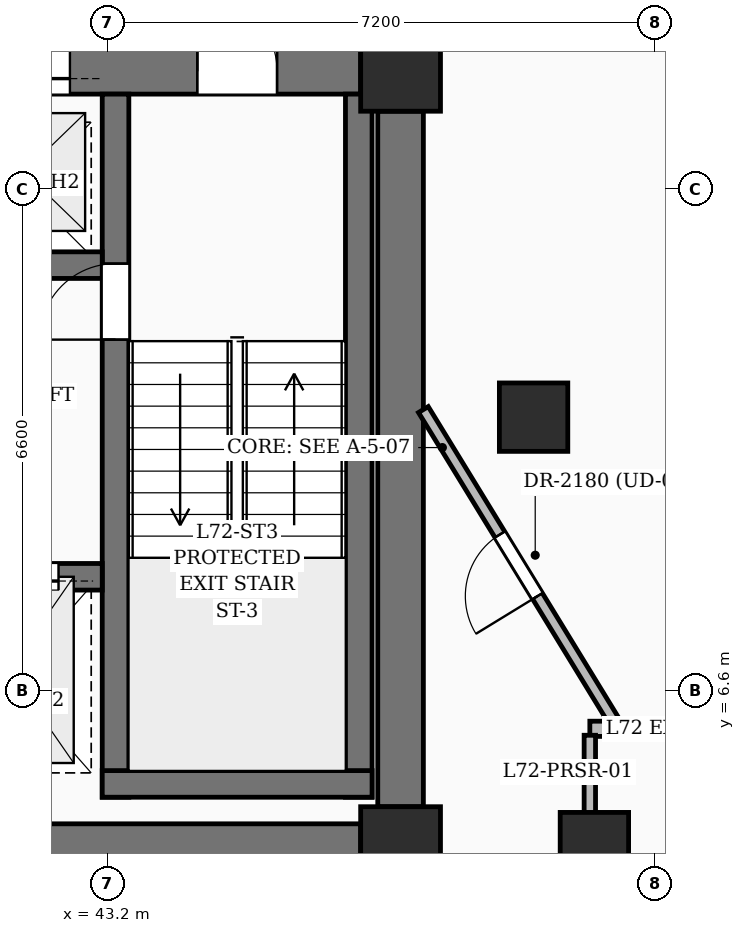
"""IFC4 building model, lengths in metres.
Left out: names, types, materials, properties, quantities, classifications, styles, units other than length and angle.
Written with IfcOpenShell. Run it as: python <this file> out.ifc"""

import sys

from ifc_helpers import new_model, si_unit, direction, frame, frame_2d, origin, origin_2d, place, context, subcontext, project, spatial, rectangle, extrude, element, fill, save


model = new_model("IFC4")
c1 = context("Model", 3, precision=1e-05, world=origin(), true_north=direction((0.0, 1.0)))
c2 = subcontext(c1, "Body", "Model", "MODEL_VIEW")
j1 = project(units=[si_unit("LENGTHUNIT", "METRE"), si_unit("PLANEANGLEUNIT", "RADIAN")], contexts=[c1])
p1 = place(None, origin())
s1 = spatial("IfcSite", under=j1, at=p1, CompositionType="ELEMENT")
p2 = place(p1, origin())
s2 = spatial("IfcBuilding", under=s1, at=p2, CompositionType="ELEMENT")
p3 = place(p2, frame((0.0, 0.0, 278.25)))
s3 = spatial("IfcBuildingStorey", under=s2, at=p3, CompositionType="ELEMENT", Elevation=278.25)
for number, where, z_axis, x_axis in (
    (1, (47.05, 4.55, 0.0), (0.0, 0.0, 1.0), (1.0, 0.0, 0.0)),
    (2, (47.05, 14.75, 0.0), (0.0, 0.0, 1.0), (1.0, 0.0, 0.0)),
):
    element("IfcColumn", number, at=place(p3, frame(where, z_axis=z_axis, x_axis=x_axis)), inside=s3, PredefinedType="COLUMN", context=c2, shape_type="SweptSolid", body=[
        extrude(rectangle(XDim=1.05, YDim=1.05, at=origin_2d()), origin(), (0.0, 0.0, 1.0), 3.75),
    ])
for number, where, z_axis, x_axis in (
    (3, (49.6, 4.55, 0.0), (0.0, 0.0, 1.0), (1.0, 0.0, 0.0)),
    (4, (48.8, 10.2, 0.0), (0.0, 0.0, 1.0), (1.0, 0.0, 0.0)),
):
    element("IfcColumn", number, at=place(p3, frame(where, z_axis=z_axis, x_axis=x_axis)), inside=s3, PredefinedType="COLUMN", context=c2, shape_type="SweptSolid", body=[
        extrude(rectangle(XDim=0.9, YDim=0.9, at=origin_2d()), origin(), (0.0, 0.0, 1.0), 3.75),
    ])
p4 = place(p3, frame((35.675, 4.55, 0.0), z_axis=(0.0, 0.0, 1.0), x_axis=(1.0, 0.0, 0.0)))
e5 = element("IfcWall", 5, at=p4, inside=s3, PredefinedType="SHEAR", context=c2, shape_type="SweptSolid", body=[
    extrude(rectangle(XDim=10.85, YDim=0.6, at=frame_2d((5.425, 0.0))), origin(), (0.0, 0.0, 1.0), 3.75),
])
p5 = place(p3, frame((35.675, 14.75, 0.0), z_axis=(0.0, 0.0, 1.0), x_axis=(1.0, 0.0, 0.0)))
e6 = element("IfcWall", 6, at=p5, inside=s3, PredefinedType="SHEAR", context=c2, shape_type="SweptSolid", body=[
    extrude(rectangle(XDim=10.85, YDim=0.6, at=frame_2d((5.425, 0.0))), origin(), (0.0, 0.0, 1.0), 3.75),
])
p6 = place(p5, frame((1.1, 0.0, 0.0)))
e7 = element("IfcOpeningElement", 7, at=p6, cuts=e6, PredefinedType="OPENING", context=c2, shape_type="SweptSolid", body=[
    extrude(rectangle(XDim=1.05, YDim=2.15, at=frame_2d((0.525, 1.075))), frame((0.0, 0.31, 0.0), z_axis=(0.0, -1.0, 0.0), x_axis=(1.0, 0.0, 0.0)), (0.0, 0.0, 1.0), 0.62),
])
p7 = place(p5, frame((8.7, 0.0, 0.0)))
e8 = element("IfcOpeningElement", 8, at=p7, cuts=e6, PredefinedType="OPENING", context=c2, shape_type="SweptSolid", body=[
    extrude(rectangle(XDim=1.05, YDim=2.15, at=frame_2d((0.525, 1.075))), frame((0.0, 0.31, 0.0), z_axis=(0.0, -1.0, 0.0), x_axis=(1.0, 0.0, 0.0)), (0.0, 0.0, 1.0), 0.62),
])
p8 = place(p5, frame((3.825, 0.0, 0.0)))
e9 = element("IfcOpeningElement", 9, at=p8, cuts=e6, PredefinedType="OPENING", context=c2, shape_type="SweptSolid", body=[
    extrude(rectangle(XDim=1.2, YDim=2.2, at=frame_2d((0.6, 1.1))), frame((0.0, 0.31, 0.0), z_axis=(0.0, -1.0, 0.0), x_axis=(1.0, 0.0, 0.0)), (0.0, 0.0, 1.0), 0.62),
])
p9 = place(p5, frame((5.825, 0.0, 0.0)))
e10 = element("IfcOpeningElement", 10, at=p9, cuts=e6, PredefinedType="OPENING", context=c2, shape_type="SweptSolid", body=[
    extrude(rectangle(XDim=1.2, YDim=2.2, at=frame_2d((0.6, 1.1))), frame((0.0, 0.31, 0.0), z_axis=(0.0, -1.0, 0.0), x_axis=(1.0, 0.0, 0.0)), (0.0, 0.0, 1.0), 0.62),
])
p10 = place(p3, frame((47.05, 5.075, 0.0), z_axis=(0.0, 0.0, 1.0), x_axis=(0.0, 1.0, 0.0)))
e11 = element("IfcWall", 11, at=p10, inside=s3, PredefinedType="SHEAR", context=c2, shape_type="SweptSolid", body=[
    extrude(rectangle(XDim=9.15, YDim=0.6, at=frame_2d((4.575, 0.0))), origin(), (0.0, 0.0, 1.0), 3.75),
])
p11 = place(p3, frame((43.3, 5.2, 0.0), z_axis=(0.0, 0.0, 1.0), x_axis=(0.0, 1.0, 0.0)))
e12 = element("IfcWall", 12, at=p11, inside=s3, PredefinedType="SOLIDWALL", context=c2, shape_type="SweptSolid", body=[
    extrude(rectangle(XDim=9.25, YDim=0.35, at=frame_2d((4.625, 0.0))), origin(), (0.0, 0.0, 1.0), 3.75),
])
p12 = place(p11, frame((6.02, 0.0, 0.0)))
e13 = element("IfcOpeningElement", 13, at=p12, cuts=e12, PredefinedType="OPENING", context=c2, shape_type="SweptSolid", body=[
    extrude(rectangle(XDim=1.0, YDim=2.15, at=frame_2d((0.5, 1.075))), frame((0.0, 0.185, 0.0), z_axis=(0.0, -1.0, 0.0), x_axis=(1.0, 0.0, 0.0)), (0.0, 0.0, 1.0), 0.37),
])
p13 = place(p3, frame((46.5, 5.2, 0.0), z_axis=(0.0, 0.0, 1.0), x_axis=(0.0, 1.0, 0.0)))
e14 = element("IfcWall", 14, at=p13, inside=s3, PredefinedType="SOLIDWALL", context=c2, shape_type="SweptSolid", body=[
    extrude(rectangle(XDim=9.25, YDim=0.35, at=frame_2d((4.625, 0.0))), origin(), (0.0, 0.0, 1.0), 3.75),
])
p14 = place(p3, frame((43.125, 5.375, 0.0), z_axis=(0.0, 0.0, 1.0), x_axis=(1.0, 0.0, 0.0)))
e15 = element("IfcWall", 15, at=p14, inside=s3, PredefinedType="SOLIDWALL", context=c2, shape_type="SweptSolid", body=[
    extrude(rectangle(XDim=3.55, YDim=0.35, at=frame_2d((1.775, 0.0))), origin(), (0.0, 0.0, 1.0), 3.75),
])
p15 = place(p3, frame((40.55, 8.1, 0.0), z_axis=(0.0, 0.0, 1.0), x_axis=(1.0, 0.0, 0.0)))
e16 = element("IfcWall", 16, at=p15, inside=s3, PredefinedType="SOLIDWALL", context=c2, shape_type="SweptSolid", body=[
    extrude(rectangle(XDim=2.575, YDim=0.35, at=frame_2d((1.288, 0.0))), origin(), (0.0, 0.0, 1.0), 3.75),
])
p16 = place(p15, frame((0.7, 0.0, 0.0)))
e17 = element("IfcOpeningElement", 17, at=p16, cuts=e16, PredefinedType="OPENING", context=c2, shape_type="SweptSolid", body=[
    extrude(rectangle(XDim=1.3, YDim=2.25, at=frame_2d((0.65, 1.125))), frame((0.0, 0.185, 0.0), z_axis=(0.0, -1.0, 0.0), x_axis=(1.0, 0.0, 0.0)), (0.0, 0.0, 1.0), 0.37),
])
p17 = place(p3, frame((39.075, 12.2, 0.0), z_axis=(0.0, 0.0, 1.0), x_axis=(1.0, 0.0, 0.0)))
e18 = element("IfcWall", 18, at=p17, inside=s3, PredefinedType="SOLIDWALL", context=c2, shape_type="SweptSolid", body=[
    extrude(rectangle(XDim=4.05, YDim=0.35, at=frame_2d((2.025, 0.0))), origin(), (0.0, 0.0, 1.0), 3.75),
])
p18 = place(p3, frame((49.75, 18.169, 0.0), z_axis=(0.0, 0.0, 1.0), x_axis=(0.441331539311, -0.897344121511, 0.0)))
e19 = element("IfcWall", 19, at=p18, inside=s3, PredefinedType="SOLIDWALL", context=c2, shape_type="SweptSolid", body=[
    extrude(rectangle(XDim=7.051, YDim=0.3, at=frame_2d((3.525, 0.0))), origin(), (0.0, 0.0, 1.0), 3.5),
])
p19 = place(p18, frame((1.545, 0.0, 0.6)))
e20 = element("IfcOpeningElement", 20, at=p19, cuts=e19, PredefinedType="OPENING", context=c2, shape_type="SweptSolid", body=[
    extrude(rectangle(XDim=2.4, YDim=2.1, at=frame_2d((1.2, 1.05))), frame((0.0, 0.16, 0.0), z_axis=(0.0, -1.0, 0.0), x_axis=(1.0, 0.0, 0.0)), (0.0, 0.0, 1.0), 0.32),
])
p20 = place(p3, frame((49.54, 6.1, 0.0), z_axis=(0.0, 0.0, 1.0), x_axis=(1.0, 0.0, 0.0)))
e21 = element("IfcWall", 21, at=p20, inside=s3, PredefinedType="PARTITIONING", context=c2, shape_type="SweptSolid", body=[
    extrude(rectangle(XDim=0.38, YDim=0.2, at=frame_2d((0.19, 0.0))), origin(), (0.0, 0.0, 1.0), 3.5),
])
p21 = place(p3, frame((49.875, 6.173, 0.0), z_axis=(0.0, 0.0, 1.0), x_axis=(-0.521911175453, 0.852999838767, 0.0)))
e22 = element("IfcWall", 22, at=p21, inside=s3, PredefinedType="PARTITIONING", context=c2, shape_type="SweptSolid", body=[
    extrude(rectangle(XDim=4.839, YDim=0.15, at=frame_2d((2.419, 0.0))), origin(), (0.0, 0.0, 1.0), 2.685),
])
p22 = place(p21, frame((1.961, 0.0, 0.0)))
e23 = element("IfcOpeningElement", 23, at=p22, cuts=e22, PredefinedType="OPENING", context=c2, shape_type="SweptSolid", body=[
    extrude(rectangle(XDim=0.95, YDim=2.2, at=frame_2d((0.475, 1.1))), frame((0.0, 0.085, 0.0), z_axis=(0.0, -1.0, 0.0), x_axis=(1.0, 0.0, 0.0)), (0.0, 0.0, 1.0), 0.17),
])
p23 = place(p3, frame((49.54, 3.22, 0.0), z_axis=(0.0, 0.0, 1.0), x_axis=(0.0, 1.0, 0.0)))
e24 = element("IfcWall", 24, at=p23, inside=s3, PredefinedType="PARTITIONING", context=c2, shape_type="SweptSolid", body=[
    extrude(rectangle(XDim=2.795, YDim=0.15, at=frame_2d((1.397, 0.0))), origin(), (0.0, 0.0, 1.0), 2.691),
])
p24 = place(p19, origin())
e25 = element("IfcWindow", 25, at=p24, inside=s3, PartitioningType="SINGLE_PANEL", PredefinedType="WINDOW", context=c2, shape_type="SweptSolid", body=[
    extrude(rectangle(XDim=2.4, YDim=2.1, at=frame_2d((1.2, 1.05))), frame((0.0, 0.03, 0.0), z_axis=(0.0, -1.0, 0.0), x_axis=(1.0, 0.0, 0.0)), (0.0, 0.0, 1.0), 0.06),
])
fill(e20, e25)
p25 = place(p7, origin())
e26 = element("IfcDoor", 26, at=p25, inside=s3, OperationType="SINGLE_SWING_LEFT", PredefinedType="DOOR", context=c2, shape_type="SweptSolid", body=[
    extrude(rectangle(XDim=1.05, YDim=2.15, at=frame_2d((0.525, 1.075))), frame((0.0, 0.025, 0.0), z_axis=(0.0, -1.0, 0.0), x_axis=(1.0, 0.0, 0.0)), (0.0, 0.0, 1.0), 0.05),
])
fill(e8, e26)
p26 = place(p12, origin())
e27 = element("IfcDoor", 27, at=p26, inside=s3, OperationType="SINGLE_SWING_LEFT", PredefinedType="DOOR", context=c2, shape_type="SweptSolid", body=[
    extrude(rectangle(XDim=1.0, YDim=2.15, at=frame_2d((0.5, 1.075))), frame((0.0, 0.025, 0.0), z_axis=(0.0, -1.0, 0.0), x_axis=(1.0, 0.0, 0.0)), (0.0, 0.0, 1.0), 0.05),
])
fill(e13, e27)
p27 = place(p16, origin())
e28 = element("IfcDoor", 28, at=p27, inside=s3, OperationType="DOUBLE_DOOR_SLIDING", PredefinedType="DOOR", context=c2, shape_type="SweptSolid", body=[
    extrude(rectangle(XDim=1.3, YDim=2.25, at=frame_2d((0.65, 1.125))), frame((0.0, 0.025, 0.0), z_axis=(0.0, -1.0, 0.0), x_axis=(1.0, 0.0, 0.0)), (0.0, 0.0, 1.0), 0.05),
])
fill(e17, e28)
p28 = place(p9, origin())
e29 = element("IfcDoor", 29, at=p28, inside=s3, OperationType="DOUBLE_DOOR_SLIDING", PredefinedType="DOOR", context=c2, shape_type="SweptSolid", body=[
    extrude(rectangle(XDim=1.2, YDim=2.2, at=frame_2d((0.6, 1.1))), frame((0.0, 0.025, 0.0), z_axis=(0.0, -1.0, 0.0), x_axis=(1.0, 0.0, 0.0)), (0.0, 0.0, 1.0), 0.05),
])
fill(e10, e29)
p29 = place(p22, origin())
e30 = element("IfcDoor", 30, at=p29, inside=s3, OperationType="SINGLE_SWING_LEFT", PredefinedType="DOOR", context=c2, shape_type="SweptSolid", body=[
    extrude(rectangle(XDim=0.95, YDim=2.2, at=frame_2d((0.475, 1.1))), frame((0.0, 0.025, 0.0), z_axis=(0.0, -1.0, 0.0), x_axis=(1.0, 0.0, 0.0)), (0.0, 0.0, 1.0), 0.05),
])
fill(e23, e30)
save(model, sys.argv[1])
